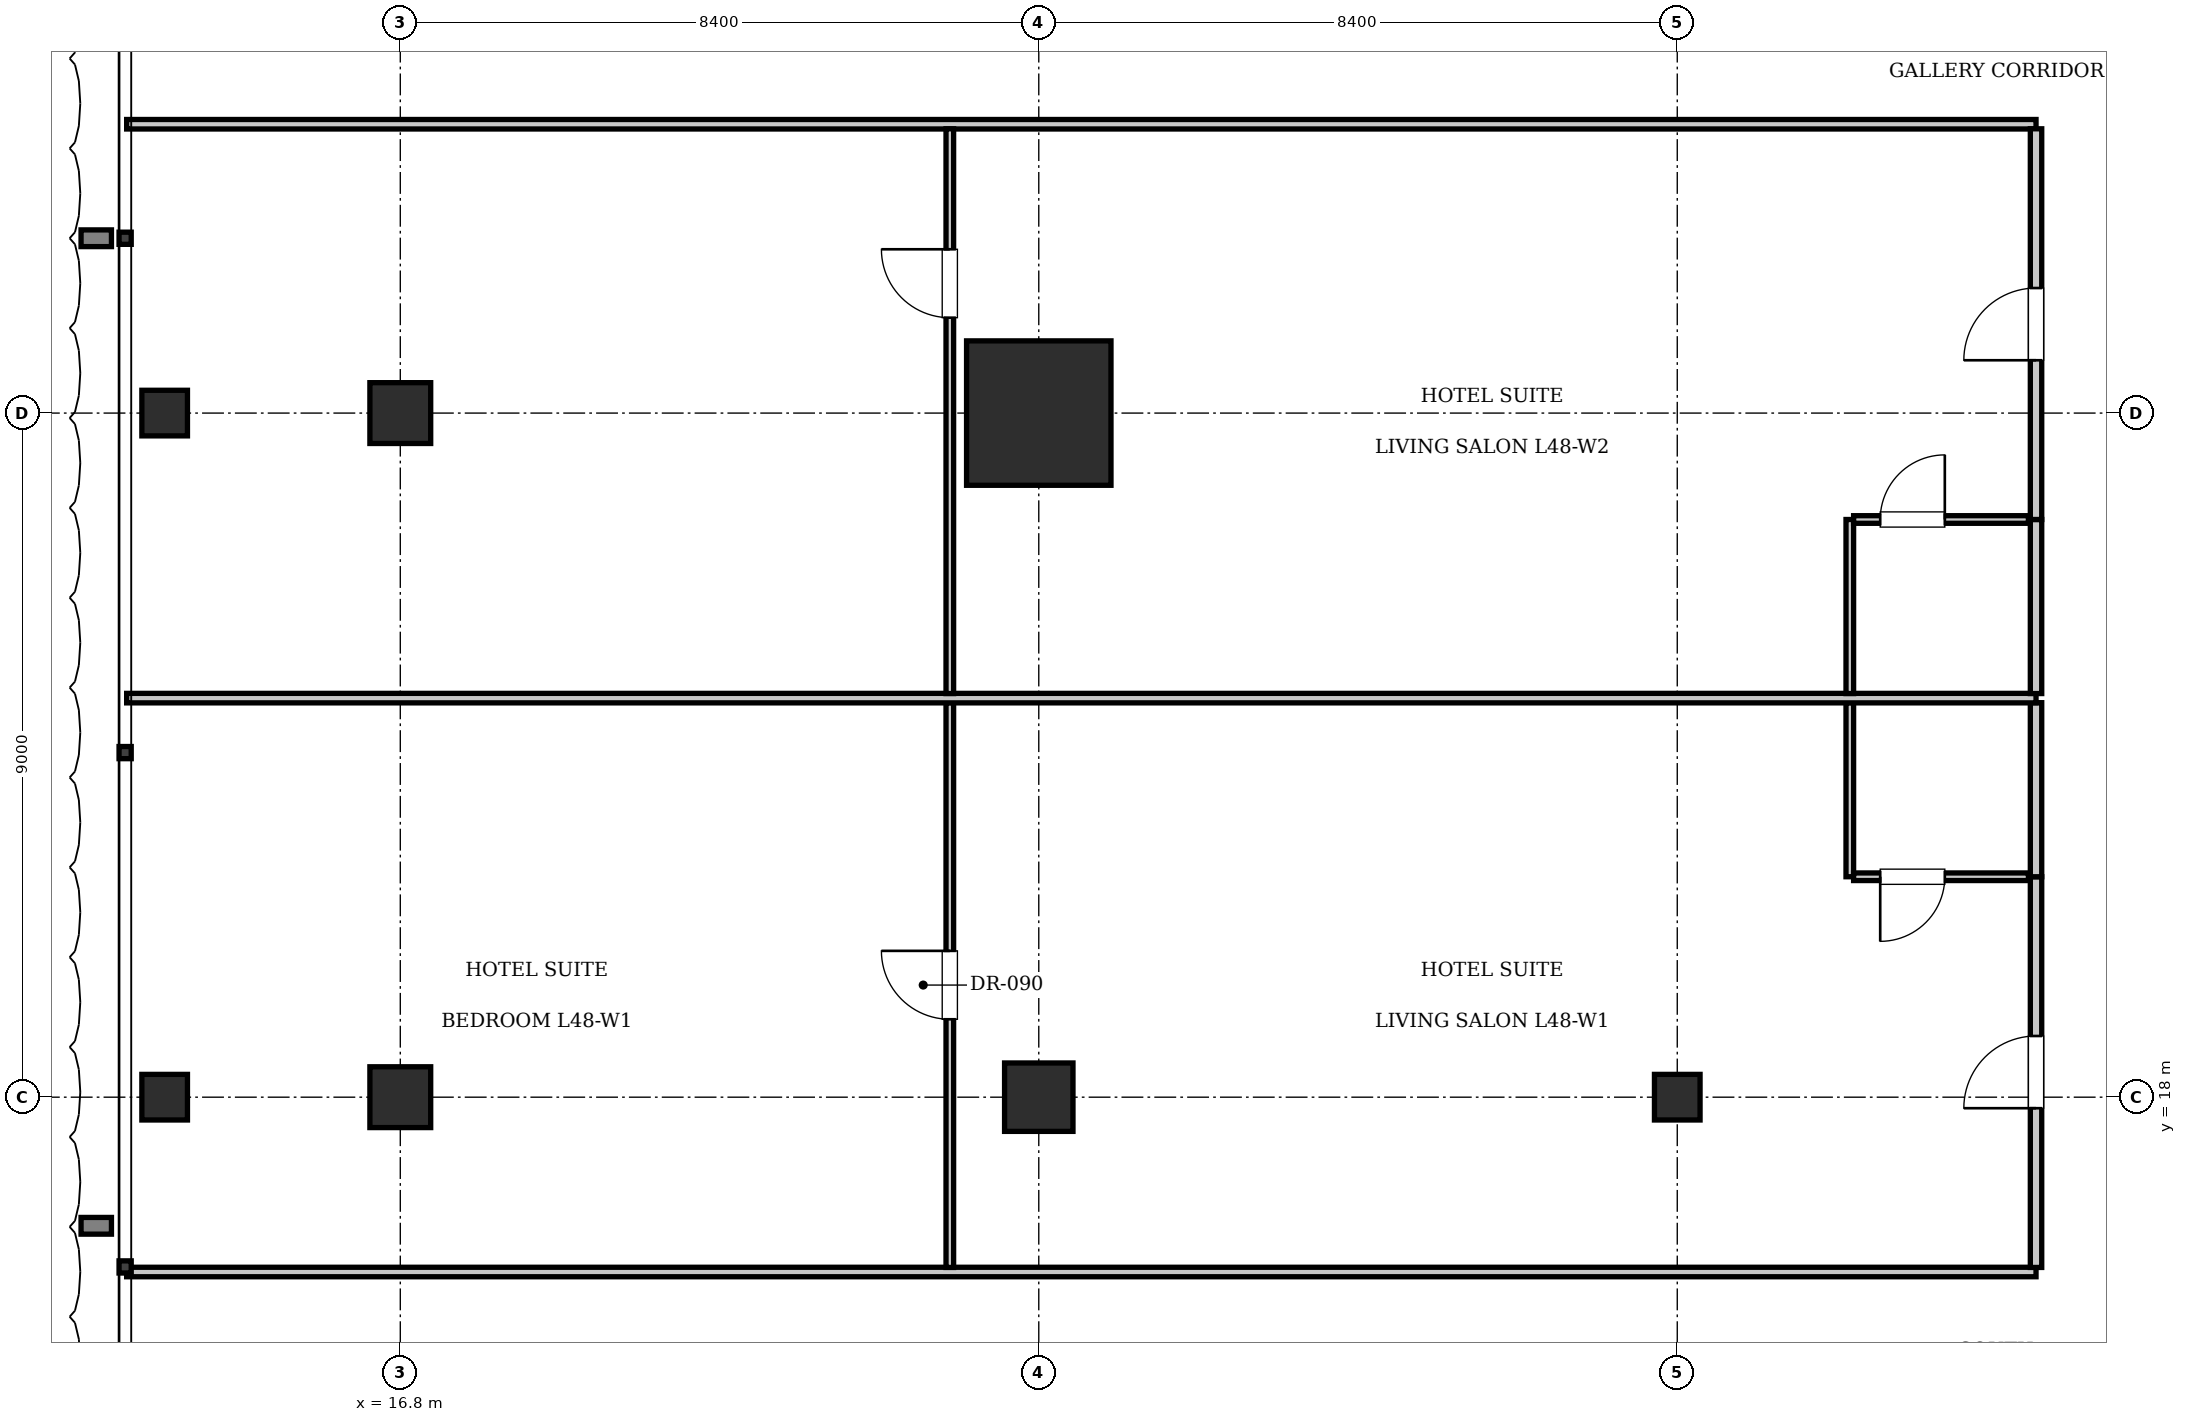
"""IFC4 building model, lengths in metres.
Left out: names, types, materials, properties, quantities, classifications, styles, units other than length and angle.
Written with IfcOpenShell. Run it as: python <this file> out.ifc"""

import sys

from ifc_helpers import new_model, si_unit, direction, frame, frame_2d, origin, origin_2d, place, context, subcontext, project, spatial, rectangle, i_section, extrude, element, fill, save


model = new_model("IFC4")
c1 = context("Model", 3, precision=1e-05, world=origin(), true_north=direction((0.0, 1.0)))
c2 = subcontext(c1, "Body", "Model", "MODEL_VIEW")
j1 = project(units=[si_unit("LENGTHUNIT", "METRE"), si_unit("PLANEANGLEUNIT", "RADIAN")], contexts=[c1])
p1 = place(None, origin())
s1 = spatial("IfcSite", under=j1, at=p1, CompositionType="ELEMENT")
p2 = place(p1, origin())
s2 = spatial("IfcBuilding", under=s1, at=p2, CompositionType="ELEMENT")
p3 = place(p2, frame((0.0, 0.0, 196.7)))
s3 = spatial("IfcBuildingStorey", under=s2, at=p3, CompositionType="ELEMENT", Elevation=196.7)
p4 = place(p3, frame((25.2, 27.0, 0.0), z_axis=(0.0, 0.0, 1.0), x_axis=(1.0, 0.0, 0.0)))
e1 = element("IfcColumn", 1, at=p4, inside=s3, PredefinedType="COLUMN", context=c2, shape_type="SweptSolid", body=[
    extrude(rectangle(XDim=1.9, YDim=1.9, at=origin_2d()), origin(), (0.0, 0.0, 1.0), 3.85),
])
p5 = place(p3, frame((25.2, 18.0, 0.0), z_axis=(0.0, 0.0, 1.0), x_axis=(1.0, 0.0, 0.0)))
e2 = element("IfcColumn", 2, at=p5, inside=s3, PredefinedType="COLUMN", context=c2, shape_type="SweptSolid", body=[
    extrude(rectangle(XDim=0.9, YDim=0.9, at=origin_2d()), origin(), (0.0, 0.0, 1.0), 3.85),
])
p6 = place(p3, frame((33.6, 18.0, 0.0), z_axis=(0.0, 0.0, 1.0), x_axis=(1.0, 0.0, 0.0)))
e3 = element("IfcColumn", 3, at=p6, inside=s3, PredefinedType="COLUMN", context=c2, shape_type="SweptSolid", body=[
    extrude(i_section(OverallWidth=0.6, OverallDepth=0.6, WebThickness=0.025, FlangeThickness=0.038, at=origin_2d()), origin(), (0.0, 0.0, 1.0), 3.85),
])
for number, where, z_axis, x_axis in (
    (4, (16.8, 18.0, 0.0), (0.0, 0.0, 1.0), (1.0, 0.0, 0.0)),
    (5, (16.8, 27.0, 0.0), (0.0, 0.0, 1.0), (1.0, 0.0, 0.0)),
):
    element("IfcColumn", number, at=place(p3, frame(where, z_axis=z_axis, x_axis=x_axis)), inside=s3, PredefinedType="COLUMN", context=c2, shape_type="SweptSolid", body=[
        extrude(rectangle(XDim=0.8, YDim=0.8, at=origin_2d()), origin(), (0.0, 0.0, 1.0), 3.85),
    ])
for number, where, z_axis, x_axis in (
    (6, (13.7, 18.0, 0.0), (0.0, 0.0, 1.0), (1.0, 0.0, 0.0)),
    (7, (13.7, 27.0, 0.0), (0.0, 0.0, 1.0), (1.0, 0.0, 0.0)),
):
    element("IfcColumn", number, at=place(p3, frame(where, z_axis=z_axis, x_axis=x_axis)), inside=s3, PredefinedType="COLUMN", context=c2, shape_type="SweptSolid", body=[
        extrude(i_section(OverallWidth=0.6, OverallDepth=0.6, WebThickness=0.025, FlangeThickness=0.038, at=origin_2d()), origin(), (0.0, 0.0, 1.0), 3.85),
    ])
for number, where, z_axis, x_axis in (
    (8, (13.2, 15.7, 0.0), (0.0, 0.0, 1.0), (1.0, 0.0, 0.0)),
    (9, (13.2, 30.8, 0.0), (0.0, 0.0, 1.0), (1.0, 0.0, 0.0)),
):
    element("IfcWall", number, at=place(p3, frame(where, z_axis=z_axis, x_axis=x_axis)), inside=s3, PredefinedType="PARTITIONING", context=c2, shape_type="SweptSolid", body=[
        extrude(rectangle(XDim=25.12, YDim=0.125, at=frame_2d((12.56, 0.0))), origin(), (0.0, 0.0, 1.0), 3.61),
    ])
p7 = place(p3, frame((38.32, 15.76, 0.0), z_axis=(0.0, 0.0, 1.0), x_axis=(0.0, 1.0, 0.0)))
e10 = element("IfcWall", 10, at=p7, inside=s3, PredefinedType="PARTITIONING", context=c2, shape_type="SweptSolid", body=[
    extrude(rectangle(XDim=5.14, YDim=0.15, at=frame_2d((2.57, 0.0))), origin(), (0.0, 0.0, 1.0), 3.61),
])
p8 = place(p7, frame((2.095, 0.0, 0.0)))
e11 = element("IfcOpeningElement", 11, at=p8, cuts=e10, PredefinedType="OPENING", context=c2, shape_type="SweptSolid", body=[
    extrude(rectangle(XDim=0.95, YDim=2.15, at=frame_2d((0.475, 1.075))), frame((0.0, 0.085, 0.0), z_axis=(0.0, -1.0, 0.0), x_axis=(1.0, 0.0, 0.0)), (0.0, 0.0, 1.0), 0.17),
])
p9 = place(p3, frame((38.32, 20.9, 0.0), z_axis=(0.0, 0.0, 1.0), x_axis=(0.0, 1.0, 0.0)))
e12 = element("IfcWall", 12, at=p9, inside=s3, PredefinedType="PARTITIONING", context=c2, shape_type="SweptSolid", body=[
    extrude(rectangle(XDim=2.29, YDim=0.15, at=frame_2d((1.145, 0.0))), origin(), (0.0, 0.0, 1.0), 3.61),
])
p10 = place(p3, frame((35.87, 20.9, 0.0), z_axis=(0.0, 0.0, 1.0), x_axis=(0.0, 1.0, 0.0)))
e13 = element("IfcWall", 13, at=p10, inside=s3, PredefinedType="PARTITIONING", context=c2, shape_type="SweptSolid", body=[
    extrude(rectangle(XDim=2.29, YDim=0.1, at=frame_2d((1.145, 0.0))), origin(), (0.0, 0.0, 1.0), 3.61),
])
p11 = place(p3, frame((35.92, 20.9, 0.0), z_axis=(0.0, 0.0, 1.0), x_axis=(1.0, 0.0, 0.0)))
e14 = element("IfcWall", 14, at=p11, inside=s3, PredefinedType="PARTITIONING", context=c2, shape_type="SweptSolid", body=[
    extrude(rectangle(XDim=2.3, YDim=0.1, at=frame_2d((1.15, 0.0))), origin(), (0.0, 0.0, 1.0), 3.61),
])
p12 = place(p11, frame((0.35, 0.0, 0.0)))
e15 = element("IfcOpeningElement", 15, at=p12, cuts=e14, PredefinedType="OPENING", context=c2, shape_type="SweptSolid", body=[
    extrude(rectangle(XDim=0.85, YDim=2.1, at=frame_2d((0.425, 1.05))), frame((0.0, 0.06, 0.0), z_axis=(0.0, -1.0, 0.0), x_axis=(1.0, 0.0, 0.0)), (0.0, 0.0, 1.0), 0.12),
])
p13 = place(p3, frame((24.03, 15.76, 0.0), z_axis=(0.0, 0.0, 1.0), x_axis=(0.0, 1.0, 0.0)))
e16 = element("IfcWall", 16, at=p13, inside=s3, PredefinedType="PARTITIONING", context=c2, shape_type="SweptSolid", body=[
    extrude(rectangle(XDim=7.43, YDim=0.1, at=frame_2d((3.715, 0.0))), origin(), (0.0, 0.0, 1.0), 3.61),
])
p14 = place(p13, frame((3.265, 0.0, 0.0)))
e17 = element("IfcOpeningElement", 17, at=p14, cuts=e16, PredefinedType="OPENING", context=c2, shape_type="SweptSolid", body=[
    extrude(rectangle(XDim=0.9, YDim=2.1, at=frame_2d((0.45, 1.05))), frame((0.0, 0.06, 0.0), z_axis=(0.0, -1.0, 0.0), x_axis=(1.0, 0.0, 0.0)), (0.0, 0.0, 1.0), 0.12),
])
p15 = place(p3, frame((13.2, 23.25, 0.0), z_axis=(0.0, 0.0, 1.0), x_axis=(1.0, 0.0, 0.0)))
e18 = element("IfcWall", 18, at=p15, inside=s3, PredefinedType="PARTITIONING", context=c2, shape_type="SweptSolid", body=[
    extrude(rectangle(XDim=25.12, YDim=0.125, at=frame_2d((12.56, 0.0))), origin(), (0.0, 0.0, 1.0), 3.61),
])
p16 = place(p3, frame((38.32, 23.31, 0.0), z_axis=(0.0, 0.0, 1.0), x_axis=(0.0, 1.0, 0.0)))
e19 = element("IfcWall", 19, at=p16, inside=s3, PredefinedType="PARTITIONING", context=c2, shape_type="SweptSolid", body=[
    extrude(rectangle(XDim=2.29, YDim=0.15, at=frame_2d((1.145, 0.0))), origin(), (0.0, 0.0, 1.0), 3.61),
])
p17 = place(p3, frame((38.32, 25.6, 0.0), z_axis=(0.0, 0.0, 1.0), x_axis=(0.0, 1.0, 0.0)))
e20 = element("IfcWall", 20, at=p17, inside=s3, PredefinedType="PARTITIONING", context=c2, shape_type="SweptSolid", body=[
    extrude(rectangle(XDim=5.14, YDim=0.15, at=frame_2d((2.57, 0.0))), origin(), (0.0, 0.0, 1.0), 3.61),
])
p18 = place(p17, frame((2.095, 0.0, 0.0)))
e21 = element("IfcOpeningElement", 21, at=p18, cuts=e20, PredefinedType="OPENING", context=c2, shape_type="SweptSolid", body=[
    extrude(rectangle(XDim=0.95, YDim=2.15, at=frame_2d((0.475, 1.075))), frame((0.0, 0.085, 0.0), z_axis=(0.0, -1.0, 0.0), x_axis=(1.0, 0.0, 0.0)), (0.0, 0.0, 1.0), 0.17),
])
p19 = place(p3, frame((35.87, 23.31, 0.0), z_axis=(0.0, 0.0, 1.0), x_axis=(0.0, 1.0, 0.0)))
e22 = element("IfcWall", 22, at=p19, inside=s3, PredefinedType="PARTITIONING", context=c2, shape_type="SweptSolid", body=[
    extrude(rectangle(XDim=2.29, YDim=0.1, at=frame_2d((1.145, 0.0))), origin(), (0.0, 0.0, 1.0), 3.61),
])
p20 = place(p3, frame((35.92, 25.6, 0.0), z_axis=(0.0, 0.0, 1.0), x_axis=(1.0, 0.0, 0.0)))
e23 = element("IfcWall", 23, at=p20, inside=s3, PredefinedType="PARTITIONING", context=c2, shape_type="SweptSolid", body=[
    extrude(rectangle(XDim=2.3, YDim=0.1, at=frame_2d((1.15, 0.0))), origin(), (0.0, 0.0, 1.0), 3.61),
])
p21 = place(p20, frame((0.35, 0.0, 0.0)))
e24 = element("IfcOpeningElement", 24, at=p21, cuts=e23, PredefinedType="OPENING", context=c2, shape_type="SweptSolid", body=[
    extrude(rectangle(XDim=0.85, YDim=2.1, at=frame_2d((0.425, 1.05))), frame((0.0, 0.06, 0.0), z_axis=(0.0, -1.0, 0.0), x_axis=(1.0, 0.0, 0.0)), (0.0, 0.0, 1.0), 0.12),
])
p22 = place(p3, frame((24.03, 23.31, 0.0), z_axis=(0.0, 0.0, 1.0), x_axis=(0.0, 1.0, 0.0)))
e25 = element("IfcWall", 25, at=p22, inside=s3, PredefinedType="PARTITIONING", context=c2, shape_type="SweptSolid", body=[
    extrude(rectangle(XDim=7.43, YDim=0.1, at=frame_2d((3.715, 0.0))), origin(), (0.0, 0.0, 1.0), 3.61),
])
p23 = place(p22, frame((4.945, 0.0, 0.0)))
e26 = element("IfcOpeningElement", 26, at=p23, cuts=e25, PredefinedType="OPENING", context=c2, shape_type="SweptSolid", body=[
    extrude(rectangle(XDim=0.9, YDim=2.1, at=frame_2d((0.45, 1.05))), frame((0.0, 0.06, 0.0), z_axis=(0.0, -1.0, 0.0), x_axis=(1.0, 0.0, 0.0)), (0.0, 0.0, 1.0), 0.12),
])
p24 = place(p12, frame((0.85, 0.0, 0.0), z_axis=(0.0, 0.0, 1.0), x_axis=(-1.0, 0.0, 0.0)))
e27 = element("IfcDoor", 27, at=p24, inside=s3, OperationType="SINGLE_SWING_RIGHT", PredefinedType="DOOR", context=c2, shape_type="SweptSolid", body=[
    extrude(rectangle(XDim=0.85, YDim=2.1, at=frame_2d((0.425, 1.05))), frame((0.0, 0.025, 0.0), z_axis=(0.0, -1.0, 0.0), x_axis=(1.0, 0.0, 0.0)), (0.0, 0.0, 1.0), 0.05),
])
fill(e15, e27)
p25 = place(p8, origin())
e28 = element("IfcDoor", 28, at=p25, inside=s3, OperationType="SINGLE_SWING_LEFT", PredefinedType="DOOR", context=c2, shape_type="SweptSolid", body=[
    extrude(rectangle(XDim=0.95, YDim=2.15, at=frame_2d((0.475, 1.075))), frame((0.0, 0.025, 0.0), z_axis=(0.0, -1.0, 0.0), x_axis=(1.0, 0.0, 0.0)), (0.0, 0.0, 1.0), 0.05),
])
fill(e11, e28)
p26 = place(p14, origin())
e29 = element("IfcDoor", 29, at=p26, inside=s3, OperationType="SINGLE_SWING_RIGHT", PredefinedType="DOOR", context=c2, shape_type="SweptSolid", body=[
    extrude(rectangle(XDim=0.9, YDim=2.1, at=frame_2d((0.45, 1.05))), frame((0.0, 0.025, 0.0), z_axis=(0.0, -1.0, 0.0), x_axis=(1.0, 0.0, 0.0)), (0.0, 0.0, 1.0), 0.05),
])
fill(e17, e29)
p27 = place(p21, origin())
e30 = element("IfcDoor", 30, at=p27, inside=s3, OperationType="SINGLE_SWING_RIGHT", PredefinedType="DOOR", context=c2, shape_type="SweptSolid", body=[
    extrude(rectangle(XDim=0.85, YDim=2.1, at=frame_2d((0.425, 1.05))), frame((0.0, 0.025, 0.0), z_axis=(0.0, -1.0, 0.0), x_axis=(1.0, 0.0, 0.0)), (0.0, 0.0, 1.0), 0.05),
])
fill(e24, e30)
p28 = place(p18, origin())
e31 = element("IfcDoor", 31, at=p28, inside=s3, OperationType="SINGLE_SWING_LEFT", PredefinedType="DOOR", context=c2, shape_type="SweptSolid", body=[
    extrude(rectangle(XDim=0.95, YDim=2.15, at=frame_2d((0.475, 1.075))), frame((0.0, 0.025, 0.0), z_axis=(0.0, -1.0, 0.0), x_axis=(1.0, 0.0, 0.0)), (0.0, 0.0, 1.0), 0.05),
])
fill(e21, e31)
p29 = place(p23, origin())
e32 = element("IfcDoor", 32, at=p29, inside=s3, OperationType="SINGLE_SWING_RIGHT", PredefinedType="DOOR", context=c2, shape_type="SweptSolid", body=[
    extrude(rectangle(XDim=0.9, YDim=2.1, at=frame_2d((0.45, 1.05))), frame((0.0, 0.025, 0.0), z_axis=(0.0, -1.0, 0.0), x_axis=(1.0, 0.0, 0.0)), (0.0, 0.0, 1.0), 0.05),
])
fill(e26, e32)
save(model, sys.argv[1])
